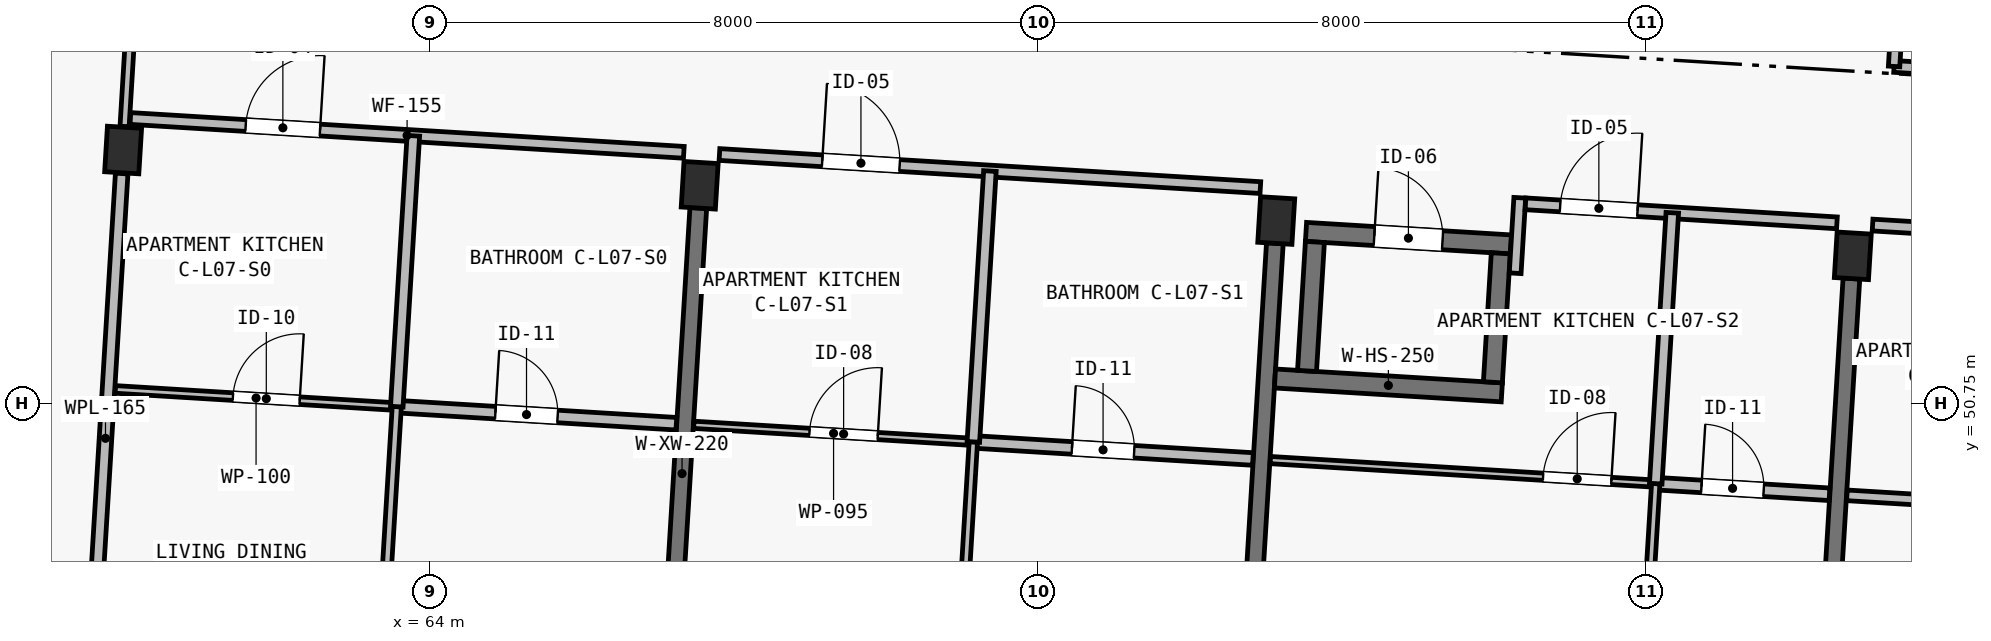
"""IFC4 building model, lengths in metres.
Left out: names, types, materials, properties, quantities, classifications, styles, units other than length and angle.
Written with IfcOpenShell. Run it as: python <this file> out.ifc"""

import sys

from ifc_helpers import new_model, si_unit, direction, frame, frame_2d, origin, origin_2d, place, context, subcontext, project, spatial, rectangle, extrude, element, fill, save


model = new_model("IFC4")
c1 = context("Model", 3, precision=1e-05, world=origin(), true_north=direction((0.0, 1.0)))
c2 = subcontext(c1, "Body", "Model", "MODEL_VIEW")
j1 = project(units=[si_unit("LENGTHUNIT", "METRE"), si_unit("PLANEANGLEUNIT", "RADIAN")], contexts=[c1])
p1 = place(None, origin())
s1 = spatial("IfcSite", under=j1, at=p1, CompositionType="ELEMENT")
p2 = place(p1, origin())
s2 = spatial("IfcBuilding", under=s1, at=p2, CompositionType="ELEMENT")
p3 = place(p2, frame((0.0, 0.0, 24.65)))
s3 = spatial("IfcBuildingStorey", under=s2, at=p3, CompositionType="ELEMENT", Elevation=24.65)
for number, where, z_axis, x_axis in (
    (1, (59.964, 54.086, 0.0), (0.0, 0.0, 1.0), (0.998, -0.061, 0.0)),
    (2, (67.55, 53.622, 0.0), (0.0, 0.0, 1.0), (0.998, -0.061, 0.0)),
    (3, (75.135, 53.158, 0.0), (0.0, 0.0, 1.0), (0.998, -0.061, 0.0)),
    (4, (82.721, 52.694, 0.0), (0.0, 0.0, 1.0), (0.998, -0.061, 0.0)),
):
    element("IfcColumn", number, at=place(p3, frame(where, z_axis=z_axis, x_axis=x_axis)), inside=s3, PredefinedType="COLUMN", context=c2, shape_type="SweptSolid", body=[
        extrude(rectangle(XDim=0.45, YDim=0.6, at=origin_2d()), origin(), (0.0, 0.0, 1.0), 3.25),
    ])
p4 = place(p3, frame((67.104, 46.335, 0.0), z_axis=(0.0, 0.0, 1.0), x_axis=(0.061034188237, 0.998135676081, 0.0)))
e5 = element("IfcWall", 5, at=p4, inside=s3, PredefinedType="SHEAR", context=c2, shape_type="SweptSolid", body=[
    extrude(rectangle(XDim=7.0, YDim=0.22, at=frame_2d((3.5, 0.0))), origin(), (0.0, 0.0, 1.0), 2.5),
])
p5 = place(p3, frame((74.69, 45.872, 0.0), z_axis=(0.0, 0.0, 1.0), x_axis=(0.061036313012, 0.998135546153, 0.0)))
e6 = element("IfcWall", 6, at=p5, inside=s3, PredefinedType="SHEAR", context=c2, shape_type="SweptSolid", body=[
    extrude(rectangle(XDim=7.0, YDim=0.22, at=frame_2d((3.5, 0.0))), origin(), (0.0, 0.0, 1.0), 2.5),
])
p6 = place(p3, frame((82.276, 45.407, 0.0), z_axis=(0.0, 0.0, 1.0), x_axis=(0.061034188237, 0.998135676081, 0.0)))
e7 = element("IfcWall", 7, at=p6, inside=s3, PredefinedType="SHEAR", context=c2, shape_type="SweptSolid", body=[
    extrude(rectangle(XDim=7.0, YDim=0.22, at=frame_2d((3.5, 0.0))), origin(), (0.0, 0.0, 1.0), 2.5),
])
p7 = place(p3, frame((75.119, 51.08, 0.0), z_axis=(0.0, 0.0, 1.0), x_axis=(0.998133370443, -0.061071882298, 0.0)))
e8 = element("IfcWall", 8, at=p7, inside=s3, PredefinedType="SHEAR", context=c2, shape_type="SweptSolid", body=[
    extrude(rectangle(XDim=2.99, YDim=0.25, at=frame_2d((1.495, 0.0))), origin(), (0.0, 0.0, 1.0), 3.25),
])
p8 = place(p3, frame((75.527, 53.009, 0.0), z_axis=(0.0, 0.0, 1.0), x_axis=(0.998129907752, -0.061128448781, 0.0)))
e9 = element("IfcWall", 9, at=p8, inside=s3, PredefinedType="SHEAR", context=c2, shape_type="SweptSolid", body=[
    extrude(rectangle(XDim=2.7, YDim=0.25, at=frame_2d((1.35, 0.0))), origin(), (0.0, 0.0, 1.0), 3.25),
])
p9 = place(p8, frame((0.9, 0.0, 0.0)))
e10 = element("IfcOpeningElement", 10, at=p9, cuts=e9, PredefinedType="OPENING", context=c2, shape_type="SweptSolid", body=[
    extrude(rectangle(XDim=0.9, YDim=2.05, at=frame_2d((0.45, 1.025))), frame((0.0, 0.14, 0.0), z_axis=(0.0, -1.0, 0.0), x_axis=(1.0, 0.0, 0.0)), (0.0, 0.0, 1.0), 0.28),
])
p10 = place(p3, frame((75.541, 51.179, 0.0), z_axis=(0.0, 0.0, 1.0), x_axis=(0.061037062968, 0.998135500293, 0.0)))
e11 = element("IfcWall", 11, at=p10, inside=s3, PredefinedType="SHEAR", context=c2, shape_type="SweptSolid", body=[
    extrude(rectangle(XDim=1.7, YDim=0.25, at=frame_2d((0.85, 0.0))), origin(), (0.0, 0.0, 1.0), 3.25),
])
p11 = place(p3, frame((77.986, 51.03, 0.0), z_axis=(0.0, 0.0, 1.0), x_axis=(0.061028314627, 0.998136035225, 0.0)))
e12 = element("IfcWall", 12, at=p11, inside=s3, PredefinedType="SHEAR", context=c2, shape_type="SweptSolid", body=[
    extrude(rectangle(XDim=1.7, YDim=0.25, at=frame_2d((0.85, 0.0))), origin(), (0.0, 0.0, 1.0), 3.25),
])
p12 = place(p3, frame((51.654, 49.585, 0.0), z_axis=(0.0, 0.0, 1.0), x_axis=(0.448621989068, 0.893721607059, 0.0)))
e13 = element("IfcWall", 13, at=p12, inside=s3, PredefinedType="SOLIDWALL", context=c2, shape_type="SweptSolid", body=[
    extrude(rectangle(XDim=19.061, YDim=0.26, at=frame_2d((9.53, 0.0))), origin(), (0.0, 0.0, 1.0), 3.0),
])
p13 = place(p12, frame((2.99, 0.0, 0.52)))
e14 = element("IfcOpeningElement", 14, at=p13, cuts=e13, PredefinedType="OPENING", context=c2, shape_type="SweptSolid", body=[
    extrude(rectangle(XDim=0.64, YDim=2.18, at=frame_2d((0.32, 1.09))), frame((0.0, 0.145, 0.0), z_axis=(0.0, -1.0, 0.0), x_axis=(1.0, 0.0, 0.0)), (0.0, 0.0, 1.0), 0.29),
])
p14 = place(p12, frame((15.65, 0.0, 0.45)))
e15 = element("IfcOpeningElement", 15, at=p14, cuts=e13, PredefinedType="OPENING", context=c2, shape_type="SweptSolid", body=[
    extrude(rectangle(XDim=0.78, YDim=2.2, at=frame_2d((0.39, 1.1))), frame((0.0, 0.145, 0.0), z_axis=(0.0, -1.0, 0.0), x_axis=(1.0, 0.0, 0.0)), (0.0, 0.0, 1.0), 0.29),
])
p15 = place(p3, frame((59.983, 54.395, 0.0), z_axis=(0.0, 0.0, 1.0), x_axis=(0.061035211258, 0.998135613525, 0.0)))
e16 = element("IfcWall", 16, at=p15, inside=s3, PredefinedType="PARTITIONING", context=c2, shape_type="SweptSolid", body=[
    extrude(rectangle(XDim=3.78, YDim=0.12, at=frame_2d((1.89, 0.0))), origin(), (0.0, 0.0, 1.0), 2.5),
])
p16 = place(p15, frame((1.35, 0.0, 0.0)))
e17 = element("IfcOpeningElement", 17, at=p16, cuts=e16, PredefinedType="OPENING", context=c2, shape_type="SweptSolid", body=[
    extrude(rectangle(XDim=0.9, YDim=2.1, at=frame_2d((0.45, 1.05))), frame((0.0, 0.075, 0.0), z_axis=(0.0, -1.0, 0.0), x_axis=(1.0, 0.0, 0.0)), (0.0, 0.0, 1.0), 0.15),
])
p17 = place(p3, frame((59.519, 46.809, 0.0), z_axis=(0.0, 0.0, 1.0), x_axis=(0.061034681366, 0.998135645927, 0.0)))
e18 = element("IfcWall", 18, at=p17, inside=s3, PredefinedType="PLUMBINGWALL", context=c2, shape_type="SweptSolid", body=[
    extrude(rectangle(XDim=6.98, YDim=0.165, at=frame_2d((3.49, 0.0))), origin(), (0.0, 0.0, 1.0), 2.5),
])
p18 = place(p3, frame((60.06, 54.501, 0.0), z_axis=(0.0, 0.0, 1.0), x_axis=(0.998135030865, -0.061044739012, 0.0)))
e19 = element("IfcWall", 19, at=p18, inside=s3, PredefinedType="PARTITIONING", context=c2, shape_type="SweptSolid", body=[
    extrude(rectangle(XDim=7.295, YDim=0.155, at=frame_2d((3.647, 0.0))), origin(), (0.0, 0.0, 1.0), 2.97),
])
p19 = place(p18, frame((1.52, 0.0, 0.0)))
e20 = element("IfcOpeningElement", 20, at=p19, cuts=e19, PredefinedType="OPENING", context=c2, shape_type="SweptSolid", body=[
    extrude(rectangle(XDim=0.98, YDim=2.15, at=frame_2d((0.49, 1.075))), frame((0.0, 0.093, 0.0), z_axis=(0.0, -1.0, 0.0), x_axis=(1.0, 0.0, 0.0)), (0.0, 0.0, 1.0), 0.185),
])
p20 = place(p3, frame((59.862, 50.936, 0.0), z_axis=(0.0, 0.0, 1.0), x_axis=(0.998133653934, -0.061067248869, 0.0)))
e21 = element("IfcWall", 21, at=p20, inside=s3, PredefinedType="PARTITIONING", context=c2, shape_type="SweptSolid", body=[
    extrude(rectangle(XDim=3.71, YDim=0.1, at=frame_2d((1.855, 0.0))), origin(), (0.0, 0.0, 1.0), 2.97),
])
p21 = place(p20, frame((1.55, 0.0, 0.0)))
e22 = element("IfcOpeningElement", 22, at=p21, cuts=e21, PredefinedType="OPENING", context=c2, shape_type="SweptSolid", body=[
    extrude(rectangle(XDim=0.88, YDim=2.1, at=frame_2d((0.44, 1.05))), frame((0.0, 0.065, 0.0), z_axis=(0.0, -1.0, 0.0), x_axis=(1.0, 0.0, 0.0)), (0.0, 0.0, 1.0), 0.13),
])
p22 = place(p3, frame((63.565, 50.71, 0.0), z_axis=(0.0, 0.0, 1.0), x_axis=(0.998136472989, -0.061021154439, 0.0)))
e23 = element("IfcWall", 23, at=p22, inside=s3, PredefinedType="PLUMBINGWALL", context=c2, shape_type="SweptSolid", body=[
    extrude(rectangle(XDim=3.685, YDim=0.165, at=frame_2d((1.842, 0.0))), origin(), (0.0, 0.0, 1.0), 2.97),
])
p23 = place(p22, frame((1.3, 0.0, 0.0)))
e24 = element("IfcOpeningElement", 24, at=p23, cuts=e23, PredefinedType="OPENING", context=c2, shape_type="SweptSolid", body=[
    extrude(rectangle(XDim=0.82, YDim=2.08, at=frame_2d((0.41, 1.04))), frame((0.0, 0.097, 0.0), z_axis=(0.0, -1.0, 0.0), x_axis=(1.0, 0.0, 0.0)), (0.0, 0.0, 1.0), 0.195),
])
p24 = place(p3, frame((63.269, 45.879, 0.0), z_axis=(0.0, 0.0, 1.0), x_axis=(0.061084424005, 0.998132602986, 0.0)))
e25 = element("IfcWall", 25, at=p24, inside=s3, PredefinedType="PARTITIONING", context=c2, shape_type="SweptSolid", body=[
    extrude(rectangle(XDim=4.84, YDim=0.12, at=frame_2d((2.42, 0.0))), origin(), (0.0, 0.0, 1.0), 2.97),
])
p25 = place(p24, frame((1.35, 0.0, 0.0)))
e26 = element("IfcOpeningElement", 26, at=p25, cuts=e25, PredefinedType="OPENING", context=c2, shape_type="SweptSolid", body=[
    extrude(rectangle(XDim=0.9, YDim=2.1, at=frame_2d((0.45, 1.05))), frame((0.0, 0.075, 0.0), z_axis=(0.0, -1.0, 0.0), x_axis=(1.0, 0.0, 0.0)), (0.0, 0.0, 1.0), 0.15),
])
p26 = place(p3, frame((63.565, 50.71, 0.0), z_axis=(0.0, 0.0, 1.0), x_axis=(0.06100299582, 0.998137582952, 0.0)))
e27 = element("IfcWall", 27, at=p26, inside=s3, PredefinedType="PLUMBINGWALL", context=c2, shape_type="SweptSolid", body=[
    extrude(rectangle(XDim=3.57, YDim=0.165, at=frame_2d((1.785, 0.0))), origin(), (0.0, 0.0, 1.0), 2.97),
])
p27 = place(p3, frame((67.81, 54.027, 0.0), z_axis=(0.0, 0.0, 1.0), x_axis=(0.998136655722, -0.061018165369, 0.0)))
e28 = element("IfcWall", 28, at=p27, inside=s3, PredefinedType="PARTITIONING", context=c2, shape_type="SweptSolid", body=[
    extrude(rectangle(XDim=7.13, YDim=0.155, at=frame_2d((3.565, 0.0))), origin(), (0.0, 0.0, 1.0), 2.97),
])
p28 = place(p27, frame((1.355, 0.0, 0.0)))
e29 = element("IfcOpeningElement", 29, at=p28, cuts=e28, PredefinedType="OPENING", context=c2, shape_type="SweptSolid", body=[
    extrude(rectangle(XDim=1.02, YDim=2.2, at=frame_2d((0.51, 1.1))), frame((0.0, 0.093, 0.0), z_axis=(0.0, -1.0, 0.0), x_axis=(1.0, 0.0, 0.0)), (0.0, 0.0, 1.0), 0.185),
])
p29 = place(p3, frame((67.472, 50.471, 0.0), z_axis=(0.0, 0.0, 1.0), x_axis=(0.998136719672, -0.061017119263, 0.0)))
e30 = element("IfcWall", 30, at=p29, inside=s3, PredefinedType="PARTITIONING", context=c2, shape_type="SweptSolid", body=[
    extrude(rectangle(XDim=3.685, YDim=0.095, at=frame_2d((1.843, 0.0))), origin(), (0.0, 0.0, 1.0), 2.97),
])
p30 = place(p29, frame((1.525, 0.0, 0.0)))
e31 = element("IfcOpeningElement", 31, at=p30, cuts=e30, PredefinedType="OPENING", context=c2, shape_type="SweptSolid", body=[
    extrude(rectangle(XDim=0.9, YDim=2.1, at=frame_2d((0.45, 1.05))), frame((0.0, 0.062, 0.0), z_axis=(0.0, -1.0, 0.0), x_axis=(1.0, 0.0, 0.0)), (0.0, 0.0, 1.0), 0.125),
])
p31 = place(p3, frame((71.15, 50.246, 0.0), z_axis=(0.0, 0.0, 1.0), x_axis=(0.998132682596, -0.061083123148, 0.0)))
e32 = element("IfcWall", 32, at=p31, inside=s3, PredefinedType="PLUMBINGWALL", context=c2, shape_type="SweptSolid", body=[
    extrude(rectangle(XDim=3.685, YDim=0.165, at=frame_2d((1.843, 0.0))), origin(), (0.0, 0.0, 1.0), 2.97),
])
p32 = place(p31, frame((1.3, 0.0, 0.0)))
e33 = element("IfcOpeningElement", 33, at=p32, cuts=e32, PredefinedType="OPENING", context=c2, shape_type="SweptSolid", body=[
    extrude(rectangle(XDim=0.82, YDim=2.08, at=frame_2d((0.41, 1.04))), frame((0.0, 0.097, 0.0), z_axis=(0.0, -1.0, 0.0), x_axis=(1.0, 0.0, 0.0)), (0.0, 0.0, 1.0), 0.195),
])
p33 = place(p3, frame((70.855, 45.415, 0.0), z_axis=(0.0, 0.0, 1.0), x_axis=(0.061034170677, 0.998135677155, 0.0)))
e34 = element("IfcWall", 34, at=p33, inside=s3, PredefinedType="PARTITIONING", context=c2, shape_type="SweptSolid", body=[
    extrude(rectangle(XDim=4.84, YDim=0.11, at=frame_2d((2.42, 0.0))), origin(), (0.0, 0.0, 1.0), 2.97),
])
p34 = place(p33, frame((1.35, 0.0, 0.0)))
e35 = element("IfcOpeningElement", 35, at=p34, cuts=e34, PredefinedType="OPENING", context=c2, shape_type="SweptSolid", body=[
    extrude(rectangle(XDim=0.9, YDim=2.1, at=frame_2d((0.45, 1.05))), frame((0.0, 0.07, 0.0), z_axis=(0.0, -1.0, 0.0), x_axis=(1.0, 0.0, 0.0)), (0.0, 0.0, 1.0), 0.14),
])
p35 = place(p3, frame((71.15, 50.246, 0.0), z_axis=(0.0, 0.0, 1.0), x_axis=(0.061071129902, 0.998133416479, 0.0)))
e36 = element("IfcWall", 36, at=p35, inside=s3, PredefinedType="PLUMBINGWALL", context=c2, shape_type="SweptSolid", body=[
    extrude(rectangle(XDim=3.57, YDim=0.165, at=frame_2d((1.785, 0.0))), origin(), (0.0, 0.0, 1.0), 2.97),
])
p36 = place(p3, frame((78.279, 52.465, 0.0), z_axis=(0.0, 0.0, 1.0), x_axis=(0.061095097219, 0.998131949742, 0.0)))
e37 = element("IfcWall", 37, at=p36, inside=s3, PredefinedType="PARTITIONING", context=c2, shape_type="SweptSolid", body=[
    extrude(rectangle(XDim=0.995, YDim=0.155, at=frame_2d((0.498, 0.0))), origin(), (0.0, 0.0, 1.0), 2.97),
])
p37 = place(p3, frame((78.415, 53.378, 0.0), z_axis=(0.0, 0.0, 1.0), x_axis=(0.998132736029, -0.061082250024, 0.0)))
e38 = element("IfcWall", 38, at=p37, inside=s3, PredefinedType="PARTITIONING", context=c2, shape_type="SweptSolid", body=[
    extrude(rectangle(XDim=4.105, YDim=0.155, at=frame_2d((2.052, 0.0))), origin(), (0.0, 0.0, 1.0), 2.97),
])
p38 = place(p37, frame((0.457, 0.0, 0.0)))
e39 = element("IfcOpeningElement", 39, at=p38, cuts=e38, PredefinedType="OPENING", context=c2, shape_type="SweptSolid", body=[
    extrude(rectangle(XDim=1.02, YDim=2.2, at=frame_2d((0.51, 1.1))), frame((0.0, 0.093, 0.0), z_axis=(0.0, -1.0, 0.0), x_axis=(1.0, 0.0, 0.0)), (0.0, 0.0, 1.0), 0.185),
])
p39 = place(p3, frame((75.058, 50.007, 0.0), z_axis=(0.0, 0.0, 1.0), x_axis=(0.998132708268, -0.061082703655, 0.0)))
e40 = element("IfcWall", 40, at=p39, inside=s3, PredefinedType="PARTITIONING", context=c2, shape_type="SweptSolid", body=[
    extrude(rectangle(XDim=5.08, YDim=0.095, at=frame_2d((2.54, 0.0))), origin(), (0.0, 0.0, 1.0), 2.97),
])
p40 = place(p39, frame((3.595, 0.0, 0.0)))
e41 = element("IfcOpeningElement", 41, at=p40, cuts=e40, PredefinedType="OPENING", context=c2, shape_type="SweptSolid", body=[
    extrude(rectangle(XDim=0.9, YDim=2.1, at=frame_2d((0.45, 1.05))), frame((0.0, 0.062, 0.0), z_axis=(0.0, -1.0, 0.0), x_axis=(1.0, 0.0, 0.0)), (0.0, 0.0, 1.0), 0.125),
])
p41 = place(p3, frame((80.129, 49.697, 0.0), z_axis=(0.0, 0.0, 1.0), x_axis=(0.998138723231, -0.060984335579, 0.0)))
e42 = element("IfcWall", 42, at=p41, inside=s3, PredefinedType="PLUMBINGWALL", context=c2, shape_type="SweptSolid", body=[
    extrude(rectangle(XDim=2.29, YDim=0.165, at=frame_2d((1.145, 0.0))), origin(), (0.0, 0.0, 1.0), 2.97),
])
p42 = place(p41, frame((0.603, 0.0, 0.0)))
e43 = element("IfcOpeningElement", 43, at=p42, cuts=e42, PredefinedType="OPENING", context=c2, shape_type="SweptSolid", body=[
    extrude(rectangle(XDim=0.82, YDim=2.08, at=frame_2d((0.41, 1.04))), frame((0.0, 0.097, 0.0), z_axis=(0.0, -1.0, 0.0), x_axis=(1.0, 0.0, 0.0)), (0.0, 0.0, 1.0), 0.195),
])
p43 = place(p3, frame((79.833, 44.866, 0.0), z_axis=(0.0, 0.0, 1.0), x_axis=(0.061037243745, 0.998135489238, 0.0)))
e44 = element("IfcWall", 44, at=p43, inside=s3, PredefinedType="PARTITIONING", context=c2, shape_type="SweptSolid", body=[
    extrude(rectangle(XDim=4.84, YDim=0.11, at=frame_2d((2.42, 0.0))), origin(), (0.0, 0.0, 1.0), 2.97),
])
p44 = place(p43, frame((1.35, 0.0, 0.0)))
e45 = element("IfcOpeningElement", 45, at=p44, cuts=e44, PredefinedType="OPENING", context=c2, shape_type="SweptSolid", body=[
    extrude(rectangle(XDim=0.9, YDim=2.1, at=frame_2d((0.45, 1.05))), frame((0.0, 0.07, 0.0), z_axis=(0.0, -1.0, 0.0), x_axis=(1.0, 0.0, 0.0)), (0.0, 0.0, 1.0), 0.14),
])
p45 = place(p3, frame((80.129, 49.697, 0.0), z_axis=(0.0, 0.0, 1.0), x_axis=(0.061066961405, 0.998133671521, 0.0)))
e46 = element("IfcWall", 46, at=p45, inside=s3, PredefinedType="PLUMBINGWALL", context=c2, shape_type="SweptSolid", body=[
    extrude(rectangle(XDim=3.57, YDim=0.165, at=frame_2d((1.785, 0.0))), origin(), (0.0, 0.0, 1.0), 2.97),
])
p46 = place(p3, frame((82.982, 53.099, 0.0), z_axis=(0.0, 0.0, 1.0), x_axis=(0.998134569689, -0.061052279168, 0.0)))
e47 = element("IfcWall", 47, at=p46, inside=s3, PredefinedType="PARTITIONING", context=c2, shape_type="SweptSolid", body=[
    extrude(rectangle(XDim=7.13, YDim=0.155, at=frame_2d((3.565, 0.0))), origin(), (0.0, 0.0, 1.0), 2.97),
])
p47 = place(p46, frame((1.355, 0.0, 0.0)))
e48 = element("IfcOpeningElement", 48, at=p47, cuts=e47, PredefinedType="OPENING", context=c2, shape_type="SweptSolid", body=[
    extrude(rectangle(XDim=0.98, YDim=2.15, at=frame_2d((0.49, 1.075))), frame((0.0, 0.093, 0.0), z_axis=(0.0, -1.0, 0.0), x_axis=(1.0, 0.0, 0.0)), (0.0, 0.0, 1.0), 0.185),
])
p48 = place(p3, frame((82.644, 49.543, 0.0), z_axis=(0.0, 0.0, 1.0), x_axis=(0.998136472989, -0.061021154439, 0.0)))
e49 = element("IfcWall", 49, at=p48, inside=s3, PredefinedType="PARTITIONING", context=c2, shape_type="SweptSolid", body=[
    extrude(rectangle(XDim=3.685, YDim=0.14, at=frame_2d((1.842, 0.0))), origin(), (0.0, 0.0, 1.0), 2.97),
])
p49 = place(p48, frame((1.525, 0.0, 0.0)))
e50 = element("IfcOpeningElement", 50, at=p49, cuts=e49, PredefinedType="OPENING", context=c2, shape_type="SweptSolid", body=[
    extrude(rectangle(XDim=0.9, YDim=2.1, at=frame_2d((0.45, 1.05))), frame((0.0, 0.085, 0.0), z_axis=(0.0, -1.0, 0.0), x_axis=(1.0, 0.0, 0.0)), (0.0, 0.0, 1.0), 0.17),
])
p50 = place(p3, frame((83.265, 55.185, 0.0), z_axis=(0.0, 0.0, 1.0), x_axis=(0.998135531673, -0.061036549799, 0.0)))
e51 = element("IfcWall", 51, at=p50, inside=s3, PredefinedType="PARTITIONING", context=c2, shape_type="SweptSolid", body=[
    extrude(rectangle(XDim=6.82, YDim=0.155, at=frame_2d((3.41, 0.0))), origin(), (0.0, 0.0, 1.0), 2.97),
])
p51 = place(p50, frame((1.205, 0.0, 0.0)))
e52 = element("IfcOpeningElement", 52, at=p51, cuts=e51, PredefinedType="OPENING", context=c2, shape_type="SweptSolid", body=[
    extrude(rectangle(XDim=1.02, YDim=2.2, at=frame_2d((0.51, 1.1))), frame((0.0, 0.093, 0.0), z_axis=(0.0, -1.0, 0.0), x_axis=(1.0, 0.0, 0.0)), (0.0, 0.0, 1.0), 0.185),
])
p52 = place(p3, frame((83.265, 55.185, 0.0), z_axis=(0.0, 0.0, 1.0), x_axis=(0.061046193261, 0.998134941923, 0.0)))
e53 = element("IfcWall", 53, at=p52, inside=s3, PredefinedType="PARTITIONING", context=c2, shape_type="SweptSolid", body=[
    extrude(rectangle(XDim=9.87, YDim=0.15, at=frame_2d((4.935, 0.0))), origin(), (0.0, 0.0, 1.0), 2.97),
])
p53 = place(p19, origin())
e54 = element("IfcDoor", 54, at=p53, inside=s3, OperationType="SINGLE_SWING_RIGHT", PredefinedType="DOOR", context=c2, shape_type="SweptSolid", body=[
    extrude(rectangle(XDim=0.98, YDim=2.15, at=frame_2d((0.49, 1.075))), frame((0.0, 0.025, 0.0), z_axis=(0.0, -1.0, 0.0), x_axis=(1.0, 0.0, 0.0)), (0.0, 0.0, 1.0), 0.05),
])
fill(e20, e54)
p54 = place(p21, origin())
e55 = element("IfcDoor", 55, at=p54, inside=s3, OperationType="SINGLE_SWING_RIGHT", PredefinedType="DOOR", context=c2, shape_type="SweptSolid", body=[
    extrude(rectangle(XDim=0.88, YDim=2.1, at=frame_2d((0.44, 1.05))), frame((0.0, 0.025, 0.0), z_axis=(0.0, -1.0, 0.0), x_axis=(1.0, 0.0, 0.0)), (0.0, 0.0, 1.0), 0.05),
])
fill(e22, e55)
p55 = place(p23, origin())
e56 = element("IfcDoor", 56, at=p55, inside=s3, OperationType="SINGLE_SWING_LEFT", PredefinedType="DOOR", context=c2, shape_type="SweptSolid", body=[
    extrude(rectangle(XDim=0.82, YDim=2.08, at=frame_2d((0.41, 1.04))), frame((0.0, 0.025, 0.0), z_axis=(0.0, -1.0, 0.0), x_axis=(1.0, 0.0, 0.0)), (0.0, 0.0, 1.0), 0.05),
])
fill(e24, e56)
p56 = place(p28, origin())
e57 = element("IfcDoor", 57, at=p56, inside=s3, OperationType="SINGLE_SWING_LEFT", PredefinedType="DOOR", context=c2, shape_type="SweptSolid", body=[
    extrude(rectangle(XDim=1.02, YDim=2.2, at=frame_2d((0.51, 1.1))), frame((0.0, 0.025, 0.0), z_axis=(0.0, -1.0, 0.0), x_axis=(1.0, 0.0, 0.0)), (0.0, 0.0, 1.0), 0.05),
])
fill(e29, e57)
p57 = place(p30, origin())
e58 = element("IfcDoor", 58, at=p57, inside=s3, OperationType="SINGLE_SWING_RIGHT", PredefinedType="DOOR", context=c2, shape_type="SweptSolid", body=[
    extrude(rectangle(XDim=0.9, YDim=2.1, at=frame_2d((0.45, 1.05))), frame((0.0, 0.025, 0.0), z_axis=(0.0, -1.0, 0.0), x_axis=(1.0, 0.0, 0.0)), (0.0, 0.0, 1.0), 0.05),
])
fill(e31, e58)
p58 = place(p32, origin())
e59 = element("IfcDoor", 59, at=p58, inside=s3, OperationType="SINGLE_SWING_LEFT", PredefinedType="DOOR", context=c2, shape_type="SweptSolid", body=[
    extrude(rectangle(XDim=0.82, YDim=2.08, at=frame_2d((0.41, 1.04))), frame((0.0, 0.025, 0.0), z_axis=(0.0, -1.0, 0.0), x_axis=(1.0, 0.0, 0.0)), (0.0, 0.0, 1.0), 0.05),
])
fill(e33, e59)
p59 = place(p38, origin())
e60 = element("IfcDoor", 60, at=p59, inside=s3, OperationType="SINGLE_SWING_RIGHT", PredefinedType="DOOR", context=c2, shape_type="SweptSolid", body=[
    extrude(rectangle(XDim=1.02, YDim=2.2, at=frame_2d((0.51, 1.1))), frame((0.0, 0.025, 0.0), z_axis=(0.0, -1.0, 0.0), x_axis=(1.0, 0.0, 0.0)), (0.0, 0.0, 1.0), 0.05),
])
fill(e39, e60)
p60 = place(p40, origin())
e61 = element("IfcDoor", 61, at=p60, inside=s3, OperationType="SINGLE_SWING_RIGHT", PredefinedType="DOOR", context=c2, shape_type="SweptSolid", body=[
    extrude(rectangle(XDim=0.9, YDim=2.1, at=frame_2d((0.45, 1.05))), frame((0.0, 0.025, 0.0), z_axis=(0.0, -1.0, 0.0), x_axis=(1.0, 0.0, 0.0)), (0.0, 0.0, 1.0), 0.05),
])
fill(e41, e61)
p61 = place(p42, origin())
e62 = element("IfcDoor", 62, at=p61, inside=s3, OperationType="SINGLE_SWING_LEFT", PredefinedType="DOOR", context=c2, shape_type="SweptSolid", body=[
    extrude(rectangle(XDim=0.82, YDim=2.08, at=frame_2d((0.41, 1.04))), frame((0.0, 0.025, 0.0), z_axis=(0.0, -1.0, 0.0), x_axis=(1.0, 0.0, 0.0)), (0.0, 0.0, 1.0), 0.05),
])
fill(e43, e62)
p62 = place(p9, origin())
e63 = element("IfcDoor", 63, at=p62, inside=s3, OperationType="SINGLE_SWING_LEFT", PredefinedType="DOOR", context=c2, shape_type="SweptSolid", body=[
    extrude(rectangle(XDim=0.9, YDim=2.05, at=frame_2d((0.45, 1.025))), frame((0.0, 0.025, 0.0), z_axis=(0.0, -1.0, 0.0), x_axis=(1.0, 0.0, 0.0)), (0.0, 0.0, 1.0), 0.05),
])
fill(e10, e63)
save(model, sys.argv[1])
